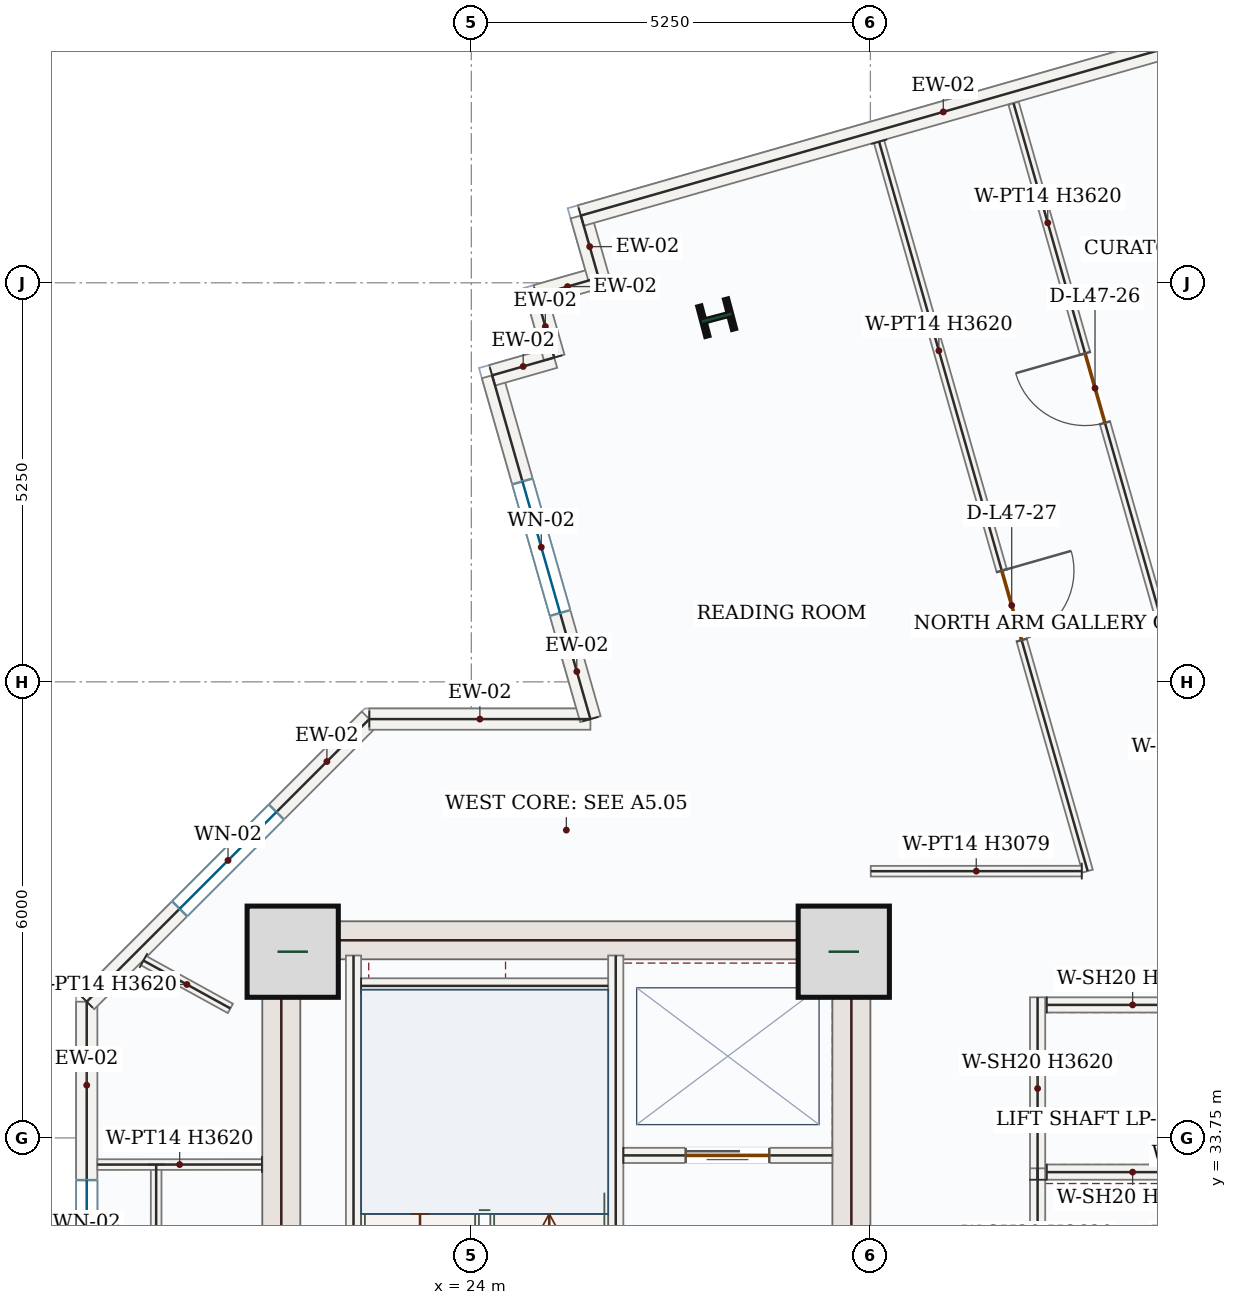
"""IFC4 building model, lengths in metres.
Left out: names, types, materials, properties, quantities, classifications, styles, units other than length and angle.
Written with IfcOpenShell. Run it as: python <this file> out.ifc"""

import sys

from ifc_helpers import new_model, si_unit, direction, frame, frame_2d, origin, origin_2d, place, context, subcontext, project, spatial, rectangle, i_section, extrude, source, transform, mapped, element, fill, save


model = new_model("IFC4")
c1 = context("Model", 3, precision=1e-05, world=origin(), true_north=direction((0.0, 1.0)))
c2 = subcontext(c1, "Body", "Model", "MODEL_VIEW")
j1 = project(units=[si_unit("LENGTHUNIT", "METRE"), si_unit("PLANEANGLEUNIT", "RADIAN")], contexts=[c1])
p1 = place(None, origin())
s1 = spatial("IfcSite", under=j1, at=p1, CompositionType="ELEMENT")
p2 = place(p1, origin())
s2 = spatial("IfcBuilding", under=s1, at=p2, CompositionType="ELEMENT")
p3 = place(p2, frame((0.0, 0.0, 201.9)))
s3 = spatial("IfcBuildingStorey", under=s2, at=p3, CompositionType="ELEMENT", Elevation=201.9)
m1 = source(origin(), c2, "Body", "SweptSolid", [
    extrude(rectangle(XDim=8.55, YDim=0.5, at=frame_2d((4.275, 0.0))), origin(), (0.0, 0.0, 1.0), 3.62),
])
p4 = place(p3, frame((21.5, 28.05, 0.0), z_axis=(0.0, 0.0, 1.0), x_axis=(0.0, 1.0, 0.0)))
e1 = element("IfcWall", 1, at=p4, inside=s3, PredefinedType="SHEAR", context=c2, shape_type="MappedRepresentation", body=[
    mapped(m1, transform((0.0, 0.0, 0.0), x_axis=(1.0, 0.0, 0.0), y_axis=(0.0, 1.0, 0.0), z_axis=(0.0, 0.0, 1.0), scale=1.0)),
])
p5 = place(p3, frame((29.0, 28.05, 0.0), z_axis=(0.0, 0.0, 1.0), x_axis=(0.0, 1.0, 0.0)))
e2 = element("IfcWall", 2, at=p5, inside=s3, PredefinedType="SHEAR", context=c2, shape_type="SweptSolid", body=[
    extrude(rectangle(XDim=8.55, YDim=0.5, at=frame_2d((4.275, 0.0))), origin(), (0.0, 0.0, 1.0), 3.62),
])
p6 = place(p5, frame((1.5, 0.0, 0.0)))
e3 = element("IfcOpeningElement", 3, at=p6, cuts=e2, PredefinedType="OPENING", context=c2, shape_type="SweptSolid", body=[
    extrude(rectangle(XDim=1.1, YDim=2.2, at=frame_2d((0.55, 1.1))), frame((0.0, 0.26, 0.0), z_axis=(0.0, -1.0, 0.0), x_axis=(1.0, 0.0, 0.0)), (0.0, 0.0, 1.0), 0.52),
])
m2 = source(origin(), c2, "Body", "SweptSolid", [
    extrude(rectangle(XDim=7.0, YDim=0.5, at=frame_2d((3.5, 0.0))), origin(), (0.0, 0.0, 1.0), 3.62),
])
p7 = place(p3, frame((21.75, 36.35, 0.0), z_axis=(0.0, 0.0, 1.0), x_axis=(1.0, 0.0, 0.0)))
e4 = element("IfcWall", 4, at=p7, inside=s3, PredefinedType="SHEAR", context=c2, shape_type="MappedRepresentation", body=[
    mapped(m2, transform((0.0, 0.0, 0.0), x_axis=(1.0, 0.0, 0.0), y_axis=(0.0, 1.0, 0.0), z_axis=(0.0, 0.0, 1.0), scale=1.0)),
])
m3 = source(origin(), c2, "Body", "SweptSolid", [
    extrude(rectangle(XDim=1.2, YDim=1.2, at=origin_2d()), origin(), (0.0, 0.0, 1.0), 3.9),
])
for number, where, z_axis, x_axis in (
    (5, (21.65, 36.2, 0.0), (0.0, 0.0, 1.0), (1.0, 0.0, 0.0)),
    (6, (28.9, 36.2, 0.0), (0.0, 0.0, 1.0), (1.0, 0.0, 0.0)),
):
    element("IfcColumn", number, at=place(p3, frame(where, z_axis=z_axis, x_axis=x_axis)), inside=s3, PredefinedType="COLUMN", context=c2, shape_type="MappedRepresentation", body=[
        mapped(m3, transform((0.0, 0.0, 0.0), x_axis=(1.0, 0.0, 0.0), y_axis=(0.0, 1.0, 0.0), z_axis=(0.0, 0.0, 1.0), scale=1.0)),
    ])
m4 = source(origin(), c2, "Body", "SweptSolid", [
    extrude(i_section(OverallWidth=0.404, OverallDepth=0.407, WebThickness=0.027, FlangeThickness=0.044, FilletRadius=0.018, at=origin_2d()), origin(), (0.0, 0.0, 1.0), 3.9),
])
p8 = place(p3, frame((27.228, 44.541, 0.0), z_axis=(0.0, 0.0, 1.0), x_axis=(-0.255445757936, 0.966823388604, 0.0)))
e7 = element("IfcColumn", 7, at=p8, inside=s3, PredefinedType="COLUMN", context=c2, shape_type="MappedRepresentation", body=[
    mapped(m4, transform((0.0, 0.0, 0.0), x_axis=(1.0, 0.0, 0.0), y_axis=(0.0, 1.0, 0.0), z_axis=(0.0, 0.0, 1.0), scale=1.0)),
])
p9 = place(p3, frame((18.94, 29.048, 0.0), z_axis=(0.0, 0.0, 1.0), x_axis=(0.0, 1.0, 0.0)))
e8 = element("IfcWall", 8, at=p9, inside=s3, PredefinedType="SOLIDWALL", context=c2, shape_type="SweptSolid", body=[
    extrude(rectangle(XDim=6.494, YDim=0.28, at=frame_2d((3.247, 0.0))), origin(), (0.0, 0.0, 1.0), 3.62),
])
p10 = place(p9, frame((2.347, 0.0, 0.85)))
e9 = element("IfcOpeningElement", 9, at=p10, cuts=e8, PredefinedType="OPENING", context=c2, shape_type="SweptSolid", body=[
    extrude(rectangle(XDim=1.8, YDim=1.75, at=frame_2d((0.9, 0.875))), frame((0.0, 0.15, 0.0), z_axis=(0.0, -1.0, 0.0), x_axis=(1.0, 0.0, 0.0)), (0.0, 0.0, 1.0), 0.3),
])
p11 = place(p3, frame((18.94, 35.542, 0.0), z_axis=(0.0, 0.0, 1.0), x_axis=(0.707106781187, 0.707106781187, 0.0)))
e10 = element("IfcWall", 10, at=p11, inside=s3, PredefinedType="SOLIDWALL", context=c2, shape_type="SweptSolid", body=[
    extrude(rectangle(XDim=5.258, YDim=0.28, at=frame_2d((2.629, 0.0))), origin(), (0.0, 0.0, 1.0), 3.62),
])
p12 = place(p11, frame((1.729, 0.0, 0.85)))
e11 = element("IfcOpeningElement", 11, at=p12, cuts=e10, PredefinedType="OPENING", context=c2, shape_type="SweptSolid", body=[
    extrude(rectangle(XDim=1.8, YDim=1.75, at=frame_2d((0.9, 0.875))), frame((0.0, 0.15, 0.0), z_axis=(0.0, -1.0, 0.0), x_axis=(1.0, 0.0, 0.0)), (0.0, 0.0, 1.0), 0.3),
])
m5 = source(origin(), c2, "Body", "SweptSolid", [
    extrude(rectangle(XDim=2.909, YDim=0.28, at=frame_2d((1.455, 0.0))), origin(), (0.0, 0.0, 1.0), 3.62),
])
p13 = place(p3, frame((22.658, 39.26, 0.0), z_axis=(0.0, 0.0, 1.0), x_axis=(1.0, 0.0, 0.0)))
e12 = element("IfcWall", 12, at=p13, inside=s3, PredefinedType="SOLIDWALL", context=c2, shape_type="MappedRepresentation", body=[
    mapped(m5, transform((0.0, 0.0, 0.0), x_axis=(1.0, 0.0, 0.0), y_axis=(0.0, 1.0, 0.0), z_axis=(0.0, 0.0, 1.0), scale=1.0)),
])
p14 = place(p3, frame((25.567, 39.26, 0.0), z_axis=(0.0, 0.0, 1.0), x_axis=(-0.274981611661, 0.961449485542, 0.0)))
e13 = element("IfcWall", 13, at=p14, inside=s3, PredefinedType="SOLIDWALL", context=c2, shape_type="SweptSolid", body=[
    extrude(rectangle(XDim=4.704, YDim=0.28, at=frame_2d((2.352, 0.0))), origin(), (0.0, 0.0, 1.0), 3.62),
])
p15 = place(p14, frame((1.452, 0.0, 0.85)))
e14 = element("IfcOpeningElement", 14, at=p15, cuts=e13, PredefinedType="OPENING", context=c2, shape_type="SweptSolid", body=[
    extrude(rectangle(XDim=1.8, YDim=1.75, at=frame_2d((0.9, 0.875))), frame((0.0, 0.15, 0.0), z_axis=(0.0, -1.0, 0.0), x_axis=(1.0, 0.0, 0.0)), (0.0, 0.0, 1.0), 0.3),
])
m6 = source(origin(), c2, "Body", "SweptSolid", [
    extrude(rectangle(XDim=0.85, YDim=0.28, at=frame_2d((0.425, 0.0))), origin(), (0.0, 0.0, 1.0), 3.62),
])
p16 = place(p3, frame((24.273, 43.782, 0.0), z_axis=(0.0, 0.0, 1.0), x_axis=(0.961469728335, 0.274910824624, 0.0)))
e15 = element("IfcWall", 15, at=p16, inside=s3, PredefinedType="SOLIDWALL", context=c2, shape_type="MappedRepresentation", body=[
    mapped(m6, transform((0.0, 0.0, 0.0), x_axis=(1.0, 0.0, 0.0), y_axis=(0.0, 1.0, 0.0), z_axis=(0.0, 0.0, 1.0), scale=1.0)),
])
m7 = source(origin(), c2, "Body", "SweptSolid", [
    extrude(rectangle(XDim=0.85, YDim=0.28, at=frame_2d((0.425, 0.0))), origin(), (0.0, 0.0, 1.0), 3.62),
])
p17 = place(p3, frame((25.091, 44.016, 0.0), z_axis=(0.0, 0.0, 1.0), x_axis=(-0.274834915789, 0.961491429532, 0.0)))
e16 = element("IfcWall", 16, at=p17, inside=s3, PredefinedType="SOLIDWALL", context=c2, shape_type="MappedRepresentation", body=[
    mapped(m7, transform((0.0, 0.0, 0.0), x_axis=(1.0, 0.0, 0.0), y_axis=(0.0, 1.0, 0.0), z_axis=(0.0, 0.0, 1.0), scale=1.0)),
])
p18 = place(p3, frame((24.857, 44.833, 0.0), z_axis=(0.0, 0.0, 1.0), x_axis=(0.961469728335, 0.274910824624, 0.0)))
e17 = element("IfcWall", 17, at=p18, inside=s3, PredefinedType="SOLIDWALL", context=c2, shape_type="MappedRepresentation", body=[
    mapped(m6, transform((0.0, 0.0, 0.0), x_axis=(1.0, 0.0, 0.0), y_axis=(0.0, 1.0, 0.0), z_axis=(0.0, 0.0, 1.0), scale=1.0)),
])
p19 = place(p3, frame((25.674, 45.067, 0.0), z_axis=(0.0, 0.0, 1.0), x_axis=(-0.274834915789, 0.961491429532, 0.0)))
e18 = element("IfcWall", 18, at=p19, inside=s3, PredefinedType="SOLIDWALL", context=c2, shape_type="MappedRepresentation", body=[
    mapped(m7, transform((0.0, 0.0, 0.0), x_axis=(1.0, 0.0, 0.0), y_axis=(0.0, 1.0, 0.0), z_axis=(0.0, 0.0, 1.0), scale=1.0)),
])
m8 = source(origin(), c2, "Body", "SweptSolid", [
    extrude(rectangle(XDim=9.92, YDim=0.28, at=frame_2d((4.96, 0.0))), origin(), (0.0, 0.0, 1.0), 3.62),
])
p20 = place(p3, frame((25.44, 45.885, 0.0), z_axis=(0.0, 0.0, 1.0), x_axis=(0.961457051276, 0.274955157346, 0.0)))
e19 = element("IfcWall", 19, at=p20, inside=s3, PredefinedType="SOLIDWALL", context=c2, shape_type="MappedRepresentation", body=[
    mapped(m8, transform((0.0, 0.0, 0.0), x_axis=(1.0, 0.0, 0.0), y_axis=(0.0, 1.0, 0.0), z_axis=(0.0, 0.0, 1.0), scale=1.0)),
])
m9 = source(origin(), c2, "Body", "SweptSolid", [
    extrude(rectangle(XDim=7.87, YDim=0.2, at=frame_2d((3.935, 0.0))), origin(), (0.0, 0.0, 1.0), 3.62),
])
p21 = place(p3, frame((22.45, 28.28, 0.0), z_axis=(0.0, 0.0, 1.0), x_axis=(0.0, 1.0, 0.0)))
e20 = element("IfcWall", 20, at=p21, inside=s3, PredefinedType="SOLIDWALL", context=c2, shape_type="MappedRepresentation", body=[
    mapped(m9, transform((0.0, 0.0, 0.0), x_axis=(1.0, 0.0, 0.0), y_axis=(0.0, 1.0, 0.0), z_axis=(0.0, 0.0, 1.0), scale=1.0)),
])
p22 = place(p3, frame((25.9, 28.15, 0.0), z_axis=(0.0, 0.0, 1.0), x_axis=(0.0, 1.0, 0.0)))
e21 = element("IfcWall", 21, at=p22, inside=s3, PredefinedType="SOLIDWALL", context=c2, shape_type="SweptSolid", body=[
    extrude(rectangle(XDim=8.0, YDim=0.2, at=frame_2d((4.0, 0.0))), origin(), (0.0, 0.0, 1.0), 3.62),
])
p23 = place(p22, frame((0.4, 0.0, 0.0)))
e22 = element("IfcOpeningElement", 22, at=p23, cuts=e21, PredefinedType="OPENING", context=c2, shape_type="SweptSolid", body=[
    extrude(rectangle(XDim=1.05, YDim=2.15, at=frame_2d((0.525, 1.075))), frame((0.0, 0.11, 0.0), z_axis=(0.0, -1.0, 0.0), x_axis=(1.0, 0.0, 0.0)), (0.0, 0.0, 1.0), 0.22),
])
m10 = source(origin(), c2, "Body", "SweptSolid", [
    extrude(rectangle(XDim=3.25, YDim=0.2, at=frame_2d((1.625, 0.0))), origin(), (0.0, 0.0, 1.0), 3.62),
])
p24 = place(p3, frame((22.55, 35.75, 0.0), z_axis=(0.0, 0.0, 1.0), x_axis=(1.0, 0.0, 0.0)))
e23 = element("IfcWall", 23, at=p24, inside=s3, PredefinedType="SOLIDWALL", context=c2, shape_type="MappedRepresentation", body=[
    mapped(m10, transform((0.0, 0.0, 0.0), x_axis=(1.0, 0.0, 0.0), y_axis=(0.0, 1.0, 0.0), z_axis=(0.0, 0.0, 1.0), scale=1.0)),
])
p25 = place(p3, frame((26.0, 33.52, 0.0), z_axis=(0.0, 0.0, 1.0), x_axis=(1.0, 0.0, 0.0)))
e24 = element("IfcWall", 24, at=p25, inside=s3, PredefinedType="SOLIDWALL", context=c2, shape_type="SweptSolid", body=[
    extrude(rectangle(XDim=2.75, YDim=0.2, at=frame_2d((1.375, 0.0))), origin(), (0.0, 0.0, 1.0), 3.62),
])
p26 = place(p25, frame((0.82, 0.0, 0.0)))
e25 = element("IfcOpeningElement", 25, at=p26, cuts=e24, PredefinedType="OPENING", context=c2, shape_type="SweptSolid", body=[
    extrude(rectangle(XDim=1.1, YDim=2.15, at=frame_2d((0.55, 1.075))), frame((0.0, 0.11, 0.0), z_axis=(0.0, -1.0, 0.0), x_axis=(1.0, 0.0, 0.0)), (0.0, 0.0, 1.0), 0.22),
])
m11 = source(origin(), c2, "Body", "SweptSolid", [
    extrude(rectangle(XDim=2.4, YDim=0.2, at=frame_2d((1.2, 0.0))), origin(), (0.0, 0.0, 1.0), 3.62),
])
p27 = place(p3, frame((31.45, 33.2, 0.0), z_axis=(0.0, 0.0, 1.0), x_axis=(0.0, 1.0, 0.0)))
e26 = element("IfcWall", 26, at=p27, inside=s3, PredefinedType="SOLIDWALL", context=c2, shape_type="MappedRepresentation", body=[
    mapped(m11, transform((0.0, 0.0, 0.0), x_axis=(1.0, 0.0, 0.0), y_axis=(0.0, 1.0, 0.0), z_axis=(0.0, 0.0, 1.0), scale=1.0)),
])
m12 = source(origin(), c2, "Body", "SweptSolid", [
    extrude(rectangle(XDim=2.26, YDim=0.2, at=frame_2d((1.13, 0.0))), origin(), (0.0, 0.0, 1.0), 3.62),
])
for number, where, z_axis, x_axis in (
    (27, (31.57, 33.3, 0.0), (0.0, 0.0, 1.0), (1.0, 0.0, 0.0)),
    (28, (31.57, 35.5, 0.0), (0.0, 0.0, 1.0), (1.0, 0.0, 0.0)),
):
    element("IfcWall", number, at=place(p3, frame(where, z_axis=z_axis, x_axis=x_axis)), inside=s3, PredefinedType="SOLIDWALL", context=c2, shape_type="MappedRepresentation", body=[
        mapped(m12, transform((0.0, 0.0, 0.0), x_axis=(1.0, 0.0, 0.0), y_axis=(0.0, 1.0, 0.0), z_axis=(0.0, 0.0, 1.0), scale=1.0)),
    ])
p28 = place(p3, frame((31.45, 30.95, 0.0), z_axis=(0.0, 0.0, 1.0), x_axis=(0.0, 1.0, 0.0)))
e29 = element("IfcWall", 29, at=p28, inside=s3, PredefinedType="SOLIDWALL", context=c2, shape_type="MappedRepresentation", body=[
    mapped(m11, transform((0.0, 0.0, 0.0), x_axis=(1.0, 0.0, 0.0), y_axis=(0.0, 1.0, 0.0), z_axis=(0.0, 0.0, 1.0), scale=1.0)),
])
p29 = place(p3, frame((33.277, 39.867, 0.0), z_axis=(0.0, 0.0, 1.0), x_axis=(-0.274985856522, 0.96144827147, 0.0)))
e30 = element("IfcWall", 30, at=p29, inside=s3, PredefinedType="PARTITIONING", context=c2, shape_type="SweptSolid", body=[
    extrude(rectangle(XDim=7.795, YDim=0.14, at=frame_2d((3.897, 0.0))), origin(), (0.0, 0.0, 1.0), 3.62),
])
p30 = place(p29, frame((3.423, 0.0, 0.0)))
e31 = element("IfcOpeningElement", 31, at=p30, cuts=e30, PredefinedType="OPENING", context=c2, shape_type="SweptSolid", body=[
    extrude(rectangle(XDim=0.95, YDim=2.15, at=frame_2d((0.475, 1.075))), frame((0.0, 0.08, 0.0), z_axis=(0.0, -1.0, 0.0), x_axis=(1.0, 0.0, 0.0)), (0.0, 0.0, 1.0), 0.16),
])
m13 = source(origin(), c2, "Body", "SweptSolid", [
    extrude(rectangle(XDim=10.061, YDim=0.14, at=frame_2d((5.031, 0.0))), origin(), (0.0, 0.0, 1.0), 2.693),
])
p31 = place(p3, frame((19.854, 33.399, 0.0), z_axis=(0.0, 0.0, 1.0), x_axis=(-0.000363980467, -0.999999933759, 0.0)))
e32 = element("IfcWall", 32, at=p31, inside=s3, PredefinedType="PARTITIONING", context=c2, shape_type="MappedRepresentation", body=[
    mapped(m13, transform((0.0, 0.0, 0.0), x_axis=(1.0, 0.0, 0.0), y_axis=(0.0, 1.0, 0.0), z_axis=(0.0, 0.0, 1.0), scale=1.0)),
])
m14 = source(origin(), c2, "Body", "SweptSolid", [
    extrude(rectangle(XDim=1.305, YDim=0.14, at=frame_2d((0.653, 0.0))), origin(), (0.0, 0.0, 1.0), 3.62),
])
p32 = place(p3, frame((19.686, 36.083, 0.0), z_axis=(0.0, 0.0, 1.0), x_axis=(0.876117183384, -0.48209820678, 0.0)))
e33 = element("IfcWall", 33, at=p32, inside=s3, PredefinedType="PARTITIONING", context=c2, shape_type="MappedRepresentation", body=[
    mapped(m14, transform((0.0, 0.0, 0.0), x_axis=(1.0, 0.0, 0.0), y_axis=(0.0, 1.0, 0.0), z_axis=(0.0, 0.0, 1.0), scale=1.0)),
])
m15 = source(origin(), c2, "Body", "SweptSolid", [
    extrude(rectangle(XDim=2.165, YDim=0.14, at=frame_2d((1.083, 0.0))), origin(), (0.0, 0.0, 1.0), 3.62),
])
p33 = place(p3, frame((21.245, 33.4, 0.0), z_axis=(0.0, 0.0, 1.0), x_axis=(-0.999999942778, -0.000338294974, 0.0)))
e34 = element("IfcWall", 34, at=p33, inside=s3, PredefinedType="PARTITIONING", context=c2, shape_type="MappedRepresentation", body=[
    mapped(m15, transform((0.0, 0.0, 0.0), x_axis=(1.0, 0.0, 0.0), y_axis=(0.0, 1.0, 0.0), z_axis=(0.0, 0.0, 1.0), scale=1.0)),
])
p34 = place(p3, frame((29.365, 46.856, 0.0), z_axis=(0.0, 0.0, 1.0), x_axis=(0.274969885882, -0.961452839123, 0.0)))
e35 = element("IfcWall", 35, at=p34, inside=s3, PredefinedType="PARTITIONING", context=c2, shape_type="SweptSolid", body=[
    extrude(rectangle(XDim=9.981, YDim=0.14, at=frame_2d((4.99, 0.0))), origin(), (0.0, 0.0, 1.0), 3.62),
])
p35 = place(p34, frame((5.87, 0.0, 0.0)))
e36 = element("IfcOpeningElement", 36, at=p35, cuts=e35, PredefinedType="OPENING", context=c2, shape_type="SweptSolid", body=[
    extrude(rectangle(XDim=0.95, YDim=2.15, at=frame_2d((0.475, 1.075))), frame((0.0, 0.08, 0.0), z_axis=(0.0, -1.0, 0.0), x_axis=(1.0, 0.0, 0.0)), (0.0, 0.0, 1.0), 0.16),
])
m16 = source(origin(), c2, "Body", "SweptSolid", [
    extrude(rectangle(XDim=2.776, YDim=0.14, at=frame_2d((1.388, 0.0))), origin(), (0.0, 0.0, 1.0), 3.079),
])
p36 = place(p3, frame((32.031, 37.26, 0.0), z_axis=(0.0, 0.0, 1.0), x_axis=(-0.999999903325, -0.000439715022, 0.0)))
e37 = element("IfcWall", 37, at=p36, inside=s3, PredefinedType="PARTITIONING", context=c2, shape_type="MappedRepresentation", body=[
    mapped(m16, transform((0.0, 0.0, 0.0), x_axis=(1.0, 0.0, 0.0), y_axis=(0.0, 1.0, 0.0), z_axis=(0.0, 0.0, 1.0), scale=1.0)),
])
m17 = source(origin(), c2, "Body", "SweptSolid", [
    extrude(rectangle(XDim=1.8, YDim=1.75, at=frame_2d((0.9, 0.875))), frame((0.0, 0.03, 0.0), z_axis=(0.0, -1.0, 0.0), x_axis=(1.0, 0.0, 0.0)), (0.0, 0.0, 1.0), 0.06),
])
p37 = place(p10, origin())
e38 = element("IfcWindow", 38, at=p37, inside=s3, PartitioningType="DOUBLE_PANEL_VERTICAL", PredefinedType="WINDOW", context=c2, shape_type="MappedRepresentation", body=[
    mapped(m17, transform((0.0, 0.0, 0.0), x_axis=(1.0, 0.0, 0.0), y_axis=(0.0, 1.0, 0.0), z_axis=(0.0, 0.0, 1.0), scale=1.0)),
])
fill(e9, e38)
p38 = place(p12, origin())
e39 = element("IfcWindow", 39, at=p38, inside=s3, PartitioningType="DOUBLE_PANEL_VERTICAL", PredefinedType="WINDOW", context=c2, shape_type="MappedRepresentation", body=[
    mapped(m17, transform((0.0, 0.0, 0.0), x_axis=(1.0, 0.0, 0.0), y_axis=(0.0, 1.0, 0.0), z_axis=(0.0, 0.0, 1.0), scale=1.0)),
])
fill(e11, e39)
p39 = place(p15, origin())
e40 = element("IfcWindow", 40, at=p39, inside=s3, PartitioningType="DOUBLE_PANEL_VERTICAL", PredefinedType="WINDOW", context=c2, shape_type="MappedRepresentation", body=[
    mapped(m17, transform((0.0, 0.0, 0.0), x_axis=(1.0, 0.0, 0.0), y_axis=(0.0, 1.0, 0.0), z_axis=(0.0, 0.0, 1.0), scale=1.0)),
])
fill(e14, e40)
m18 = source(origin(), c2, "Body", "SweptSolid", [
    extrude(rectangle(XDim=1.1, YDim=2.15, at=frame_2d((0.55, 1.075))), frame((0.0, 0.025, 0.0), z_axis=(0.0, -1.0, 0.0), x_axis=(1.0, 0.0, 0.0)), (0.0, 0.0, 1.0), 0.05),
])
p40 = place(p26, origin())
e41 = element("IfcDoor", 41, at=p40, inside=s3, OperationType="DOUBLE_DOOR_SLIDING", PredefinedType="DOOR", context=c2, shape_type="MappedRepresentation", body=[
    mapped(m18, transform((0.0, 0.0, 0.0), x_axis=(1.0, 0.0, 0.0), y_axis=(0.0, 1.0, 0.0), z_axis=(0.0, 0.0, 1.0), scale=1.0)),
])
fill(e25, e41)
m19 = source(origin(), c2, "Body", "SweptSolid", [
    extrude(rectangle(XDim=0.95, YDim=2.15, at=frame_2d((0.475, 1.075))), frame((0.0, 0.025, 0.0), z_axis=(0.0, -1.0, 0.0), x_axis=(1.0, 0.0, 0.0)), (0.0, 0.0, 1.0), 0.05),
])
p41 = place(p30, origin())
e42 = element("IfcDoor", 42, at=p41, inside=s3, OperationType="SINGLE_SWING_RIGHT", PredefinedType="DOOR", context=c2, shape_type="MappedRepresentation", body=[
    mapped(m19, transform((0.0, 0.0, 0.0), x_axis=(1.0, 0.0, 0.0), y_axis=(0.0, 1.0, 0.0), z_axis=(0.0, 0.0, 1.0), scale=1.0)),
])
fill(e31, e42)
p42 = place(p35, origin())
e43 = element("IfcDoor", 43, at=p42, inside=s3, OperationType="SINGLE_SWING_LEFT", PredefinedType="DOOR", context=c2, shape_type="MappedRepresentation", body=[
    mapped(m19, transform((0.0, 0.0, 0.0), x_axis=(1.0, 0.0, 0.0), y_axis=(0.0, 1.0, 0.0), z_axis=(0.0, 0.0, 1.0), scale=1.0)),
])
fill(e36, e43)
save(model, sys.argv[1])
